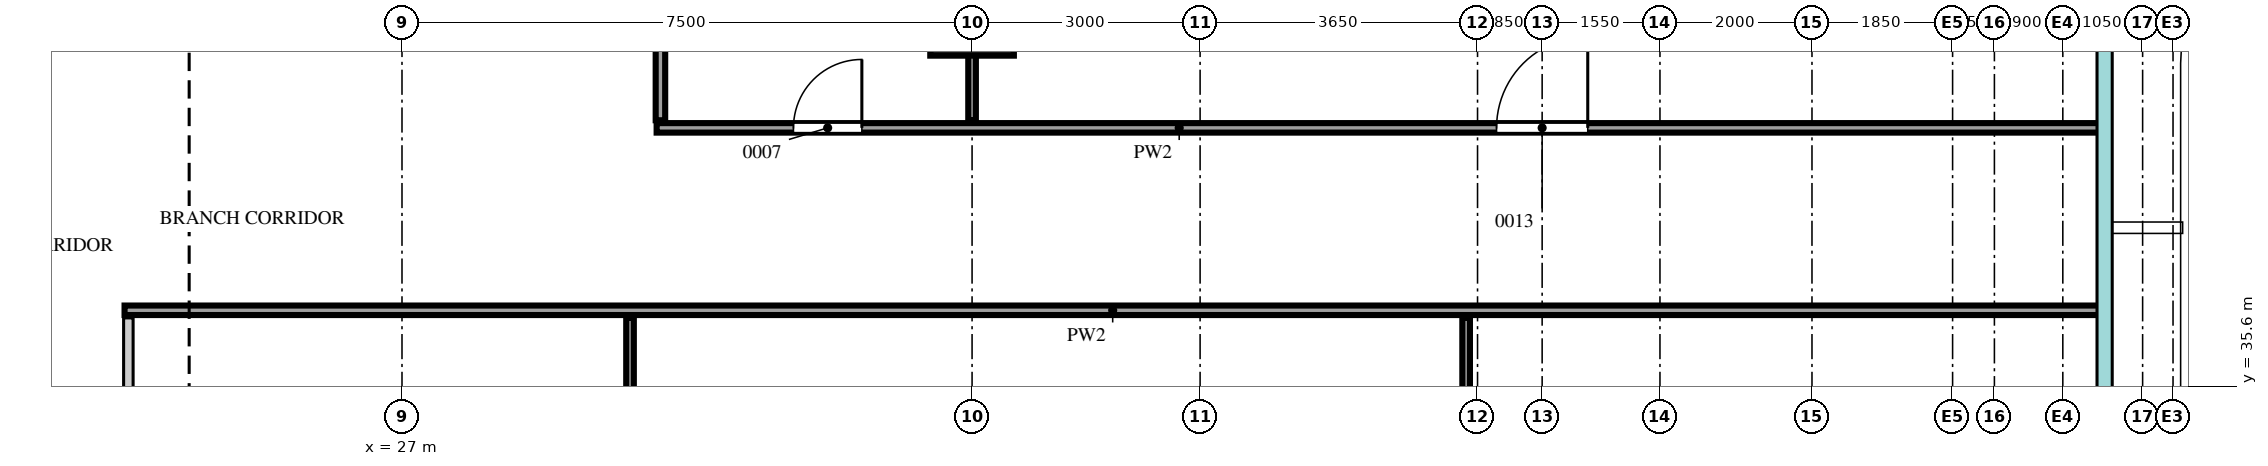
"""IFC4 building model, lengths in metres.
Left out: names, types, materials, properties, quantities, classifications, styles, units other than length and angle.
Written with IfcOpenShell. Run it as: python <this file> out.ifc"""

import sys

from ifc_helpers import new_model, si_unit, direction, frame, frame_2d, origin, origin_2d, place, context, subcontext, project, spatial, rectangle, extrude, source, transform, mapped, element, fill, save


model = new_model("IFC4")
c1 = context("Model", 3, precision=1e-05, world=origin(), true_north=direction((0.0, 1.0)))
c2 = subcontext(c1, "Body", "Model", "MODEL_VIEW")
j1 = project(units=[si_unit("LENGTHUNIT", "METRE"), si_unit("PLANEANGLEUNIT", "RADIAN")], contexts=[c1])
p1 = place(None, origin())
s1 = spatial("IfcSite", under=j1, at=p1, CompositionType="ELEMENT")
p2 = place(p1, origin())
s2 = spatial("IfcBuilding", under=s1, at=p2, CompositionType="ELEMENT")
p3 = place(p2, frame((0.0, 0.0, 222.2)))
s3 = spatial("IfcBuildingStorey", under=s2, at=p3, CompositionType="ELEMENT", Elevation=222.2)
m1 = source(origin(), c2, "Body", "SweptSolid", [
    extrude(rectangle(XDim=1.1, YDim=1.1, at=origin_2d()), origin(), (0.0, 0.0, 1.0), 3.75),
])
p4 = place(p3, frame((34.5, 40.5, 0.0), z_axis=(0.0, 0.0, 1.0), x_axis=(1.0, 0.0, 0.0)))
e1 = element("IfcColumn", 1, at=p4, inside=s3, PredefinedType="COLUMN", context=c2, shape_type="MappedRepresentation", body=[
    mapped(m1, transform((0.0, 0.0, 0.0))),
])
m2 = source(origin(), c2, "Body", "SweptSolid", [
    extrude(rectangle(XDim=18.4, YDim=0.125, at=frame_2d((9.2, 0.0))), origin(), (0.0, 0.0, 1.0), 3.8),
])
p5 = place(p3, frame((23.4, 18.1, 0.0), z_axis=(0.0, 0.0, 1.0), x_axis=(0.0, 1.0, 0.0)))
e2 = element("IfcWall", 2, at=p5, inside=s3, PredefinedType="PARTITIONING", context=c2, shape_type="MappedRepresentation", body=[
    mapped(m2, transform((0.0, 0.0, 0.0))),
])
m3 = source(origin(), c2, "Body", "SweptSolid", [
    extrude(rectangle(XDim=1.2, YDim=2.1, at=frame_2d((0.6, 1.05))), frame((0.0, 0.073, 0.0), z_axis=(0.0, -1.0, 0.0), x_axis=(1.0, 0.0, 0.0)), (0.0, 0.0, 1.0), 0.145),
])
p6 = place(p5, frame((8.6, 0.0, 0.0)))
e3 = element("IfcOpeningElement", 3, at=p6, cuts=e2, PredefinedType="OPENING", context=c2, shape_type="MappedRepresentation", body=[
    mapped(m3, transform((0.0, 0.0, 0.0))),
])
m4 = source(origin(), c2, "Body", "SweptSolid", [
    extrude(rectangle(XDim=18.4, YDim=0.1, at=frame_2d((9.2, 0.0))), origin(), (0.0, 0.0, 1.0), 3.8),
])
for number, where, z_axis, x_axis in (
    (4, (30.0, 18.1, 0.0), (0.0, 0.0, 1.0), (0.0, 1.0, 0.0)),
    (5, (41.0, 18.1, 0.0), (0.0, 0.0, 1.0), (0.0, 1.0, 0.0)),
):
    element("IfcWall", number, at=place(p3, frame(where, z_axis=z_axis, x_axis=x_axis)), inside=s3, PredefinedType="PARTITIONING", context=c2, shape_type="MappedRepresentation", body=[
        mapped(m4, transform((0.0, 0.0, 0.0))),
    ])
m5 = source(origin(), c2, "Body", "SweptSolid", [
    extrude(rectangle(XDim=26.0, YDim=0.125, at=frame_2d((13.0, 0.0))), origin(), (0.0, 0.0, 1.0), 3.8),
])
p7 = place(p3, frame((23.35, 36.6, 0.0), z_axis=(0.0, 0.0, 1.0), x_axis=(1.0, 0.0, 0.0)))
e6 = element("IfcWall", 6, at=p7, inside=s3, PredefinedType="PARTITIONING", context=c2, shape_type="MappedRepresentation", body=[
    mapped(m5, transform((0.0, 0.0, 0.0))),
])
m6 = source(origin(), c2, "Body", "SweptSolid", [
    extrude(rectangle(XDim=19.0, YDim=0.125, at=frame_2d((9.5, 0.0))), origin(), (0.0, 0.0, 1.0), 3.8),
])
p8 = place(p3, frame((30.35, 39.0, 0.0), z_axis=(0.0, 0.0, 1.0), x_axis=(1.0, 0.0, 0.0)))
e7 = element("IfcWall", 7, at=p8, inside=s3, PredefinedType="PARTITIONING", context=c2, shape_type="MappedRepresentation", body=[
    mapped(m6, transform((0.0, 0.0, 0.0))),
])
m7 = source(origin(), c2, "Body", "SweptSolid", [
    extrude(rectangle(XDim=0.9, YDim=2.1, at=frame_2d((0.45, 1.05))), frame((0.0, 0.073, 0.0), z_axis=(0.0, -1.0, 0.0), x_axis=(1.0, 0.0, 0.0)), (0.0, 0.0, 1.0), 0.145),
])
p9 = place(p8, frame((1.8, 0.0, 0.0)))
e8 = element("IfcOpeningElement", 8, at=p9, cuts=e7, PredefinedType="OPENING", context=c2, shape_type="MappedRepresentation", body=[
    mapped(m7, transform((0.0, 0.0, 0.0))),
])
p10 = place(p8, frame((11.05, 0.0, 0.0)))
e9 = element("IfcOpeningElement", 9, at=p10, cuts=e7, PredefinedType="OPENING", context=c2, shape_type="MappedRepresentation", body=[
    mapped(m3, transform((0.0, 0.0, 0.0))),
])
m8 = source(origin(), c2, "Body", "SweptSolid", [
    extrude(rectangle(XDim=10.25, YDim=0.125, at=frame_2d((5.125, 0.0))), origin(), (0.0, 0.0, 1.0), 3.8),
])
p11 = place(p3, frame((30.4, 39.1, 0.0), z_axis=(0.0, 0.0, 1.0), x_axis=(0.0, 1.0, 0.0)))
e10 = element("IfcWall", 10, at=p11, inside=s3, PredefinedType="PARTITIONING", context=c2, shape_type="MappedRepresentation", body=[
    mapped(m8, transform((0.0, 0.0, 0.0))),
])
m9 = source(origin(), c2, "Body", "SweptSolid", [
    extrude(rectangle(XDim=10.25, YDim=0.1, at=frame_2d((5.125, 0.0))), origin(), (0.0, 0.0, 1.0), 3.35),
])
p12 = place(p3, frame((34.5, 39.1, 0.0), z_axis=(0.0, 0.0, 1.0), x_axis=(0.0, 1.0, 0.0)))
e11 = element("IfcWall", 11, at=p12, inside=s3, PredefinedType="PARTITIONING", context=c2, shape_type="MappedRepresentation", body=[
    mapped(m9, transform((0.0, 0.0, 0.0))),
])
m10 = source(origin(), c2, "Body", "SweptSolid", [
    extrude(rectangle(XDim=0.9, YDim=2.1, at=frame_2d((0.45, 1.05))), frame((0.0, 0.025, 0.0), z_axis=(0.0, -1.0, 0.0), x_axis=(1.0, 0.0, 0.0)), (0.0, 0.0, 1.0), 0.05),
])
p13 = place(p9, origin())
e12 = element("IfcDoor", 12, at=p13, inside=s3, OperationType="SINGLE_SWING_LEFT", PredefinedType="DOOR", context=c2, shape_type="MappedRepresentation", body=[
    mapped(m10, transform((0.0, 0.0, 0.0))),
])
fill(e8, e12)
m11 = source(origin(), c2, "Body", "SweptSolid", [
    extrude(rectangle(XDim=1.2, YDim=2.1, at=frame_2d((0.6, 1.05))), frame((0.0, 0.025, 0.0), z_axis=(0.0, -1.0, 0.0), x_axis=(1.0, 0.0, 0.0)), (0.0, 0.0, 1.0), 0.05),
])
p14 = place(p10, origin())
e13 = element("IfcDoor", 13, at=p14, inside=s3, OperationType="SINGLE_SWING_LEFT", PredefinedType="DOOR", context=c2, shape_type="MappedRepresentation", body=[
    mapped(m11, transform((0.0, 0.0, 0.0))),
])
fill(e9, e13)
save(model, sys.argv[1])
